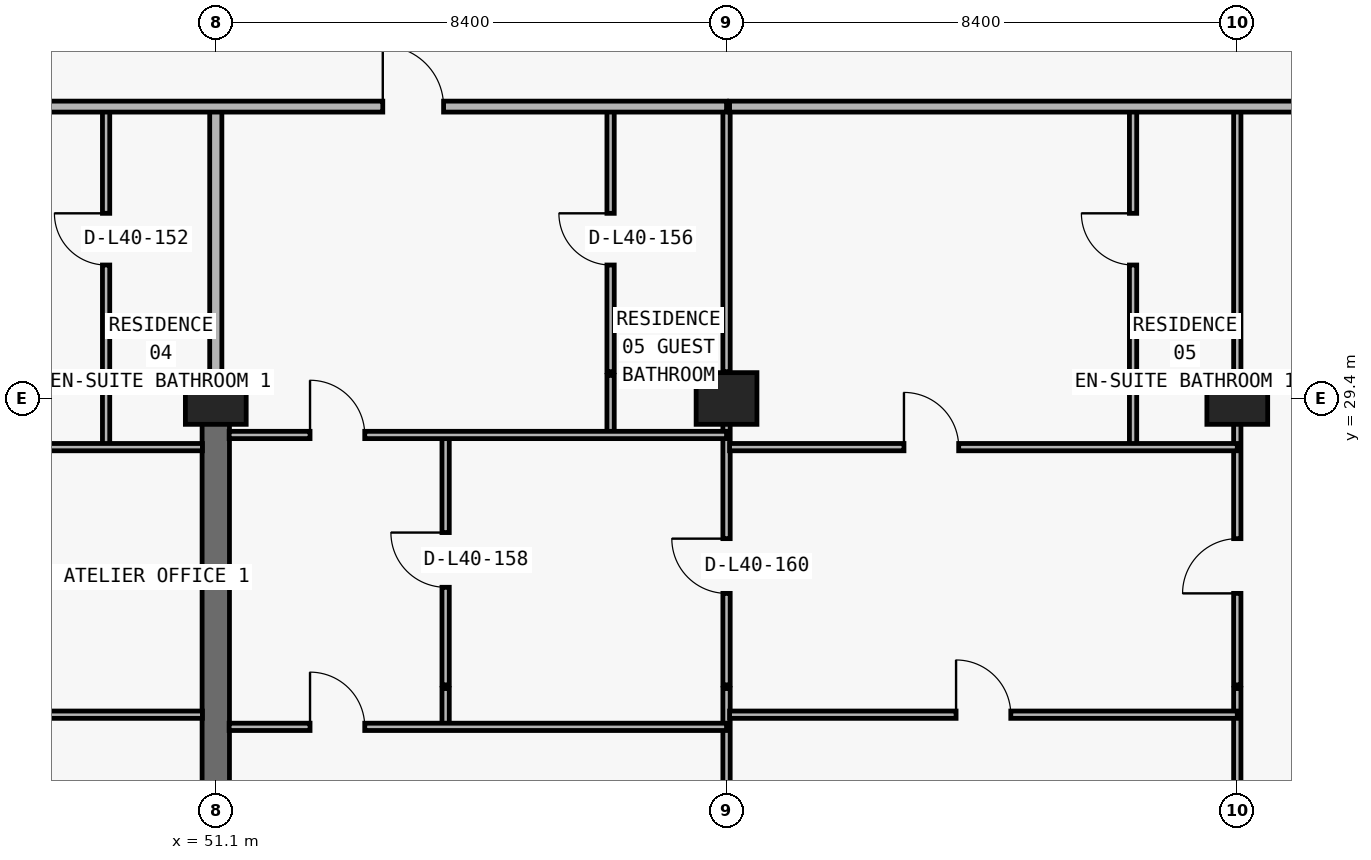
"""IFC4 building model, lengths in metres.
Left out: names, types, materials, properties, quantities, classifications, styles, units other than length and angle.
Written with IfcOpenShell. Run it as: python <this file> out.ifc"""

import sys

from ifc_helpers import new_model, si_unit, direction, frame, frame_2d, origin, origin_2d, place, context, subcontext, project, spatial, rectangle, extrude, element, fill, save


model = new_model("IFC4")
c1 = context("Model", 3, precision=1e-05, world=origin(), true_north=direction((0.0, 1.0)))
c2 = subcontext(c1, "Body", "Model", "MODEL_VIEW")
j1 = project(units=[si_unit("LENGTHUNIT", "METRE"), si_unit("PLANEANGLEUNIT", "RADIAN")], contexts=[c1])
p1 = place(None, origin())
s1 = spatial("IfcSite", under=j1, at=p1, CompositionType="ELEMENT")
p2 = place(p1, origin())
s2 = spatial("IfcBuilding", under=s1, at=p2, CompositionType="ELEMENT")
p3 = place(p2, frame((0.0, 0.0, 145.5)))
s3 = spatial("IfcBuildingStorey", under=s2, at=p3, CompositionType="ELEMENT", Elevation=145.5)
for number, where, z_axis, x_axis in (
    (1, (51.1, 29.4, 0.0), (0.0, 0.0, 1.0), (1.0, 0.0, 0.0)),
    (2, (59.5, 29.4, 0.0), (0.0, 0.0, 1.0), (1.0, 0.0, 0.0)),
    (3, (67.9, 29.4, 0.0), (0.0, 0.0, 1.0), (1.0, 0.0, 0.0)),
):
    element("IfcColumn", number, at=place(p3, frame(where, z_axis=z_axis, x_axis=x_axis)), inside=s3, PredefinedType="COLUMN", context=c2, shape_type="SweptSolid", body=[
        extrude(rectangle(XDim=1.0, YDim=0.85, at=origin_2d()), origin(), (0.0, 0.0, 1.0), 3.05),
    ])
p4 = place(p3, frame((51.1, 20.8, 0.0), z_axis=(0.0, 0.0, 1.0), x_axis=(0.0, 1.0, 0.0)))
e4 = element("IfcWall", 4, at=p4, inside=s3, PredefinedType="SHEAR", context=c2, shape_type="SweptSolid", body=[
    extrude(rectangle(XDim=8.6, YDim=0.45, at=frame_2d((4.3, 0.0))), origin(), (0.0, 0.0, 1.0), 3.05),
])
p5 = place(p3, frame((49.296, 28.6, 0.0), z_axis=(0.0, 0.0, 1.0), x_axis=(0.0, 1.0, 0.0)))
e5 = element("IfcWall", 5, at=p5, inside=s3, PredefinedType="PARTITIONING", context=c2, shape_type="SweptSolid", body=[
    extrude(rectangle(XDim=1.18, YDim=0.12, at=frame_2d((0.59, 0.0))), origin(), (0.0, 0.0, 1.0), 3.05),
])
p6 = place(p3, frame((49.296, 29.84, 0.0), z_axis=(0.0, 0.0, 1.0), x_axis=(0.0, 1.0, 0.0)))
e6 = element("IfcWall", 6, at=p6, inside=s3, PredefinedType="PARTITIONING", context=c2, shape_type="SweptSolid", body=[
    extrude(rectangle(XDim=4.36, YDim=0.12, at=frame_2d((2.18, 0.0))), origin(), (0.0, 0.0, 1.0), 3.05),
])
p7 = place(p6, frame((1.755, 0.0, 0.0)))
e7 = element("IfcOpeningElement", 7, at=p7, cuts=e6, PredefinedType="OPENING", context=c2, shape_type="SweptSolid", body=[
    extrude(rectangle(XDim=0.85, YDim=2.1, at=frame_2d((0.425, 1.05))), frame((0.0, 0.07, 0.0), z_axis=(0.0, -1.0, 0.0), x_axis=(1.0, 0.0, 0.0)), (0.0, 0.0, 1.0), 0.14),
])
p8 = place(p3, frame((51.1, 29.405, 0.0), z_axis=(0.0, 0.0, 1.0), x_axis=(0.0, 1.0, 0.0)))
e8 = element("IfcWall", 8, at=p8, inside=s3, PredefinedType="PARTITIONING", context=c2, shape_type="SweptSolid", body=[
    extrude(rectangle(XDim=0.375, YDim=0.2, at=frame_2d((0.188, 0.0))), origin(), (0.0, 0.0, 1.0), 3.05),
])
p9 = place(p3, frame((51.1, 29.84, 0.0), z_axis=(0.0, 0.0, 1.0), x_axis=(0.0, 1.0, 0.0)))
e9 = element("IfcWall", 9, at=p9, inside=s3, PredefinedType="PARTITIONING", context=c2, shape_type="SweptSolid", body=[
    extrude(rectangle(XDim=4.36, YDim=0.2, at=frame_2d((2.18, 0.0))), origin(), (0.0, 0.0, 1.0), 2.335),
])
p10 = place(p3, frame((54.88, 24.0, 0.0), z_axis=(0.0, 0.0, 1.0), x_axis=(0.0, 1.0, 0.0)))
e10 = element("IfcWall", 10, at=p10, inside=s3, PredefinedType="PARTITIONING", context=c2, shape_type="SweptSolid", body=[
    extrude(rectangle(XDim=0.63, YDim=0.12, at=frame_2d((0.315, 0.0))), origin(), (0.0, 0.0, 1.0), 3.05),
])
p11 = place(p3, frame((54.88, 24.69, 0.0), z_axis=(0.0, 0.0, 1.0), x_axis=(0.0, 1.0, 0.0)))
e11 = element("IfcWall", 11, at=p11, inside=s3, PredefinedType="PARTITIONING", context=c2, shape_type="SweptSolid", body=[
    extrude(rectangle(XDim=4.11, YDim=0.12, at=frame_2d((2.055, 0.0))), origin(), (0.0, 0.0, 1.0), 3.05),
])
p12 = place(p11, frame((1.605, 0.0, 0.0)))
e12 = element("IfcOpeningElement", 12, at=p12, cuts=e11, PredefinedType="OPENING", context=c2, shape_type="SweptSolid", body=[
    extrude(rectangle(XDim=0.9, YDim=2.15, at=frame_2d((0.45, 1.075))), frame((0.0, 0.07, 0.0), z_axis=(0.0, -1.0, 0.0), x_axis=(1.0, 0.0, 0.0)), (0.0, 0.0, 1.0), 0.14),
])
p13 = place(p3, frame((57.593, 28.8, 0.0), z_axis=(0.0, 0.0, 1.0), x_axis=(0.0, 1.0, 0.0)))
e13 = element("IfcWall", 13, at=p13, inside=s3, PredefinedType="PARTITIONING", context=c2, shape_type="SweptSolid", body=[
    extrude(rectangle(XDim=0.98, YDim=0.12, at=frame_2d((0.49, 0.0))), origin(), (0.0, 0.0, 1.0), 3.05),
])
p14 = place(p3, frame((57.593, 29.84, 0.0), z_axis=(0.0, 0.0, 1.0), x_axis=(0.0, 1.0, 0.0)))
e14 = element("IfcWall", 14, at=p14, inside=s3, PredefinedType="PARTITIONING", context=c2, shape_type="SweptSolid", body=[
    extrude(rectangle(XDim=4.36, YDim=0.12, at=frame_2d((2.18, 0.0))), origin(), (0.0, 0.0, 1.0), 3.05),
])
p15 = place(p14, frame((1.755, 0.0, 0.0)))
e15 = element("IfcOpeningElement", 15, at=p15, cuts=e14, PredefinedType="OPENING", context=c2, shape_type="SweptSolid", body=[
    extrude(rectangle(XDim=0.85, YDim=2.1, at=frame_2d((0.425, 1.05))), frame((0.0, 0.07, 0.0), z_axis=(0.0, -1.0, 0.0), x_axis=(1.0, 0.0, 0.0)), (0.0, 0.0, 1.0), 0.14),
])
p16 = place(p3, frame((59.5, 8.84, 0.0), z_axis=(0.0, 0.0, 1.0), x_axis=(0.0, 1.0, 0.0)))
e16 = element("IfcWall", 16, at=p16, inside=s3, PredefinedType="PARTITIONING", context=c2, shape_type="SweptSolid", body=[
    extrude(rectangle(XDim=15.79, YDim=0.12, at=frame_2d((7.895, 0.0))), origin(), (0.0, 0.0, 1.0), 2.174),
])
p17 = place(p3, frame((59.5, 24.69, 0.0), z_axis=(0.0, 0.0, 1.0), x_axis=(0.0, 1.0, 0.0)))
e17 = element("IfcWall", 17, at=p17, inside=s3, PredefinedType="PARTITIONING", context=c2, shape_type="SweptSolid", body=[
    extrude(rectangle(XDim=5.09, YDim=0.12, at=frame_2d((2.545, 0.0))), origin(), (0.0, 0.0, 1.0), 2.174),
])
p18 = place(p17, frame((1.505, 0.0, 0.0)))
e18 = element("IfcOpeningElement", 18, at=p18, cuts=e17, PredefinedType="OPENING", context=c2, shape_type="SweptSolid", body=[
    extrude(rectangle(XDim=0.9, YDim=2.124, at=frame_2d((0.45, 1.062))), frame((0.0, 0.07, 0.0), z_axis=(0.0, -1.0, 0.0), x_axis=(1.0, 0.0, 0.0)), (0.0, 0.0, 1.0), 0.14),
])
p19 = place(p3, frame((59.5, 29.84, 0.0), z_axis=(0.0, 0.0, 1.0), x_axis=(0.0, 1.0, 0.0)))
e19 = element("IfcWall", 19, at=p19, inside=s3, PredefinedType="PARTITIONING", context=c2, shape_type="SweptSolid", body=[
    extrude(rectangle(XDim=4.36, YDim=0.12, at=frame_2d((2.18, 0.0))), origin(), (0.0, 0.0, 1.0), 2.174),
])
p20 = place(p3, frame((66.186, 28.6, 0.0), z_axis=(0.0, 0.0, 1.0), x_axis=(0.0, 1.0, 0.0)))
e20 = element("IfcWall", 20, at=p20, inside=s3, PredefinedType="PARTITIONING", context=c2, shape_type="SweptSolid", body=[
    extrude(rectangle(XDim=1.18, YDim=0.12, at=frame_2d((0.59, 0.0))), origin(), (0.0, 0.0, 1.0), 3.05),
])
p21 = place(p3, frame((66.186, 29.84, 0.0), z_axis=(0.0, 0.0, 1.0), x_axis=(0.0, 1.0, 0.0)))
e21 = element("IfcWall", 21, at=p21, inside=s3, PredefinedType="PARTITIONING", context=c2, shape_type="SweptSolid", body=[
    extrude(rectangle(XDim=4.36, YDim=0.12, at=frame_2d((2.18, 0.0))), origin(), (0.0, 0.0, 1.0), 3.05),
])
p22 = place(p21, frame((1.755, 0.0, 0.0)))
e22 = element("IfcOpeningElement", 22, at=p22, cuts=e21, PredefinedType="OPENING", context=c2, shape_type="SweptSolid", body=[
    extrude(rectangle(XDim=0.85, YDim=2.1, at=frame_2d((0.425, 1.05))), frame((0.0, 0.07, 0.0), z_axis=(0.0, -1.0, 0.0), x_axis=(1.0, 0.0, 0.0)), (0.0, 0.0, 1.0), 0.14),
])
p23 = place(p3, frame((67.9, 8.84, 0.0), z_axis=(0.0, 0.0, 1.0), x_axis=(0.0, 1.0, 0.0)))
e23 = element("IfcWall", 23, at=p23, inside=s3, PredefinedType="PARTITIONING", context=c2, shape_type="SweptSolid", body=[
    extrude(rectangle(XDim=15.79, YDim=0.12, at=frame_2d((7.895, 0.0))), origin(), (0.0, 0.0, 1.0), 2.174),
])
p24 = place(p3, frame((67.9, 24.69, 0.0), z_axis=(0.0, 0.0, 1.0), x_axis=(0.0, 1.0, 0.0)))
e24 = element("IfcWall", 24, at=p24, inside=s3, PredefinedType="PARTITIONING", context=c2, shape_type="SweptSolid", body=[
    extrude(rectangle(XDim=5.09, YDim=0.12, at=frame_2d((2.545, 0.0))), origin(), (0.0, 0.0, 1.0), 2.174),
])
p25 = place(p24, frame((1.505, 0.0, 0.0)))
e25 = element("IfcOpeningElement", 25, at=p25, cuts=e24, PredefinedType="OPENING", context=c2, shape_type="SweptSolid", body=[
    extrude(rectangle(XDim=0.9, YDim=2.124, at=frame_2d((0.45, 1.062))), frame((0.0, 0.07, 0.0), z_axis=(0.0, -1.0, 0.0), x_axis=(1.0, 0.0, 0.0)), (0.0, 0.0, 1.0), 0.14),
])
p26 = place(p3, frame((67.9, 29.84, 0.0), z_axis=(0.0, 0.0, 1.0), x_axis=(0.0, 1.0, 0.0)))
e26 = element("IfcWall", 26, at=p26, inside=s3, PredefinedType="PARTITIONING", context=c2, shape_type="SweptSolid", body=[
    extrude(rectangle(XDim=4.36, YDim=0.12, at=frame_2d((2.18, 0.0))), origin(), (0.0, 0.0, 1.0), 2.174),
])
p27 = place(p3, frame((51.32, 24.0, 0.0), z_axis=(0.0, 0.0, 1.0), x_axis=(1.0, 0.0, 0.0)))
e27 = element("IfcWall", 27, at=p27, inside=s3, PredefinedType="PARTITIONING", context=c2, shape_type="SweptSolid", body=[
    extrude(rectangle(XDim=8.18, YDim=0.12, at=frame_2d((4.09, 0.0))), origin(), (0.0, 0.0, 1.0), 3.05),
])
p28 = place(p27, frame((1.33, 0.0, 0.0)))
e28 = element("IfcOpeningElement", 28, at=p28, cuts=e27, PredefinedType="OPENING", context=c2, shape_type="SweptSolid", body=[
    extrude(rectangle(XDim=0.9, YDim=2.15, at=frame_2d((0.45, 1.075))), frame((0.0, 0.07, 0.0), z_axis=(0.0, -1.0, 0.0), x_axis=(1.0, 0.0, 0.0)), (0.0, 0.0, 1.0), 0.14),
])
p29 = place(p3, frame((42.705, 24.2, 0.0), z_axis=(0.0, 0.0, 1.0), x_axis=(1.0, 0.0, 0.0)))
e29 = element("IfcWall", 29, at=p29, inside=s3, PredefinedType="PARTITIONING", context=c2, shape_type="SweptSolid", body=[
    extrude(rectangle(XDim=8.175, YDim=0.12, at=frame_2d((4.087, 0.0))), origin(), (0.0, 0.0, 1.0), 3.05),
])
p30 = place(p29, frame((3.637, 0.0, 0.0)))
e30 = element("IfcOpeningElement", 30, at=p30, cuts=e29, PredefinedType="OPENING", context=c2, shape_type="SweptSolid", body=[
    extrude(rectangle(XDim=0.9, YDim=2.15, at=frame_2d((0.45, 1.075))), frame((0.0, 0.07, 0.0), z_axis=(0.0, -1.0, 0.0), x_axis=(1.0, 0.0, 0.0)), (0.0, 0.0, 1.0), 0.14),
])
p31 = place(p3, frame((59.55, 24.2, 0.0), z_axis=(0.0, 0.0, 1.0), x_axis=(1.0, 0.0, 0.0)))
e31 = element("IfcWall", 31, at=p31, inside=s3, PredefinedType="PARTITIONING", context=c2, shape_type="SweptSolid", body=[
    extrude(rectangle(XDim=8.35, YDim=0.12, at=frame_2d((4.175, 0.0))), origin(), (0.0, 0.0, 1.0), 3.05),
])
p32 = place(p31, frame((3.725, 0.0, 0.0)))
e32 = element("IfcOpeningElement", 32, at=p32, cuts=e31, PredefinedType="OPENING", context=c2, shape_type="SweptSolid", body=[
    extrude(rectangle(XDim=0.9, YDim=2.15, at=frame_2d((0.45, 1.075))), frame((0.0, 0.07, 0.0), z_axis=(0.0, -1.0, 0.0), x_axis=(1.0, 0.0, 0.0)), (0.0, 0.0, 1.0), 0.14),
])
p33 = place(p3, frame((42.7, 28.6, 0.0), z_axis=(0.0, 0.0, 1.0), x_axis=(1.0, 0.0, 0.0)))
e33 = element("IfcWall", 33, at=p33, inside=s3, PredefinedType="PARTITIONING", context=c2, shape_type="SweptSolid", body=[
    extrude(rectangle(XDim=8.18, YDim=0.12, at=frame_2d((4.09, 0.0))), origin(), (0.0, 0.0, 1.0), 3.05),
])
p34 = place(p33, frame((2.848, 0.0, 0.0)))
e34 = element("IfcOpeningElement", 34, at=p34, cuts=e33, PredefinedType="OPENING", context=c2, shape_type="SweptSolid", body=[
    extrude(rectangle(XDim=0.9, YDim=2.15, at=frame_2d((0.45, 1.075))), frame((0.0, 0.07, 0.0), z_axis=(0.0, -1.0, 0.0), x_axis=(1.0, 0.0, 0.0)), (0.0, 0.0, 1.0), 0.14),
])
p35 = place(p3, frame((59.55, 28.6, 0.0), z_axis=(0.0, 0.0, 1.0), x_axis=(1.0, 0.0, 0.0)))
e35 = element("IfcWall", 35, at=p35, inside=s3, PredefinedType="PARTITIONING", context=c2, shape_type="SweptSolid", body=[
    extrude(rectangle(XDim=8.35, YDim=0.12, at=frame_2d((4.175, 0.0))), origin(), (0.0, 0.0, 1.0), 3.05),
])
p36 = place(p35, frame((2.868, 0.0, 0.0)))
e36 = element("IfcOpeningElement", 36, at=p36, cuts=e35, PredefinedType="OPENING", context=c2, shape_type="SweptSolid", body=[
    extrude(rectangle(XDim=0.9, YDim=2.15, at=frame_2d((0.45, 1.075))), frame((0.0, 0.07, 0.0), z_axis=(0.0, -1.0, 0.0), x_axis=(1.0, 0.0, 0.0)), (0.0, 0.0, 1.0), 0.14),
])
p37 = place(p3, frame((51.32, 28.8, 0.0), z_axis=(0.0, 0.0, 1.0), x_axis=(1.0, 0.0, 0.0)))
e37 = element("IfcWall", 37, at=p37, inside=s3, PredefinedType="PARTITIONING", context=c2, shape_type="SweptSolid", body=[
    extrude(rectangle(XDim=8.18, YDim=0.12, at=frame_2d((4.09, 0.0))), origin(), (0.0, 0.0, 1.0), 3.05),
])
p38 = place(p37, frame((1.33, 0.0, 0.0)))
e38 = element("IfcOpeningElement", 38, at=p38, cuts=e37, PredefinedType="OPENING", context=c2, shape_type="SweptSolid", body=[
    extrude(rectangle(XDim=0.9, YDim=2.15, at=frame_2d((0.45, 1.075))), frame((0.0, 0.07, 0.0), z_axis=(0.0, -1.0, 0.0), x_axis=(1.0, 0.0, 0.0)), (0.0, 0.0, 1.0), 0.14),
])
p39 = place(p3, frame((26.7, 34.2, 0.0), z_axis=(0.0, 0.0, 1.0), x_axis=(1.0, 0.0, 0.0)))
e39 = element("IfcWall", 39, at=p39, inside=s3, PredefinedType="PARTITIONING", context=c2, shape_type="SweptSolid", body=[
    extrude(rectangle(XDim=32.8, YDim=0.18, at=frame_2d((16.4, 0.0))), origin(), (0.0, 0.0, 1.0), 3.05),
])
p40 = place(p39, frame((2.519, 0.0, 0.0)))
e40 = element("IfcOpeningElement", 40, at=p40, cuts=e39, PredefinedType="OPENING", context=c2, shape_type="SweptSolid", body=[
    extrude(rectangle(XDim=1.0, YDim=2.2, at=frame_2d((0.5, 1.1))), frame((0.0, 0.1, 0.0), z_axis=(0.0, -1.0, 0.0), x_axis=(1.0, 0.0, 0.0)), (0.0, 0.0, 1.0), 0.2),
])
p41 = place(p39, frame((10.792, 0.0, 0.0)))
e41 = element("IfcOpeningElement", 41, at=p41, cuts=e39, PredefinedType="OPENING", context=c2, shape_type="SweptSolid", body=[
    extrude(rectangle(XDim=1.0, YDim=2.2, at=frame_2d((0.5, 1.1))), frame((0.0, 0.1, 0.0), z_axis=(0.0, -1.0, 0.0), x_axis=(1.0, 0.0, 0.0)), (0.0, 0.0, 1.0), 0.2),
])
p42 = place(p39, frame((27.146, 0.0, 0.0)))
e42 = element("IfcOpeningElement", 42, at=p42, cuts=e39, PredefinedType="OPENING", context=c2, shape_type="SweptSolid", body=[
    extrude(rectangle(XDim=1.0, YDim=2.2, at=frame_2d((0.5, 1.1))), frame((0.0, 0.1, 0.0), z_axis=(0.0, -1.0, 0.0), x_axis=(1.0, 0.0, 0.0)), (0.0, 0.0, 1.0), 0.2),
])
p43 = place(p3, frame((59.55, 34.2, 0.0), z_axis=(0.0, 0.0, 1.0), x_axis=(1.0, 0.0, 0.0)))
e43 = element("IfcWall", 43, at=p43, inside=s3, PredefinedType="PARTITIONING", context=c2, shape_type="SweptSolid", body=[
    extrude(rectangle(XDim=10.55, YDim=0.18, at=frame_2d((5.275, 0.0))), origin(), (0.0, 0.0, 1.0), 3.05),
])
p44 = place(p7, origin())
e44 = element("IfcDoor", 44, at=p44, inside=s3, OperationType="SINGLE_SWING_RIGHT", PredefinedType="DOOR", context=c2, shape_type="SweptSolid", body=[
    extrude(rectangle(XDim=0.85, YDim=2.1, at=frame_2d((0.425, 1.05))), frame((0.0, 0.025, 0.0), z_axis=(0.0, -1.0, 0.0), x_axis=(1.0, 0.0, 0.0)), (0.0, 0.0, 1.0), 0.05),
])
fill(e7, e44)
p45 = place(p42, origin())
e45 = element("IfcDoor", 45, at=p45, inside=s3, OperationType="SINGLE_SWING_LEFT", PredefinedType="DOOR", context=c2, shape_type="SweptSolid", body=[
    extrude(rectangle(XDim=1.0, YDim=2.2, at=frame_2d((0.5, 1.1))), frame((0.0, 0.025, 0.0), z_axis=(0.0, -1.0, 0.0), x_axis=(1.0, 0.0, 0.0)), (0.0, 0.0, 1.0), 0.05),
])
fill(e42, e45)
p46 = place(p15, origin())
e46 = element("IfcDoor", 46, at=p46, inside=s3, OperationType="SINGLE_SWING_RIGHT", PredefinedType="DOOR", context=c2, shape_type="SweptSolid", body=[
    extrude(rectangle(XDim=0.85, YDim=2.1, at=frame_2d((0.425, 1.05))), frame((0.0, 0.025, 0.0), z_axis=(0.0, -1.0, 0.0), x_axis=(1.0, 0.0, 0.0)), (0.0, 0.0, 1.0), 0.05),
])
fill(e15, e46)
p47 = place(p38, origin())
e47 = element("IfcDoor", 47, at=p47, inside=s3, OperationType="SINGLE_SWING_LEFT", PredefinedType="DOOR", context=c2, shape_type="SweptSolid", body=[
    extrude(rectangle(XDim=0.9, YDim=2.15, at=frame_2d((0.45, 1.075))), frame((0.0, 0.025, 0.0), z_axis=(0.0, -1.0, 0.0), x_axis=(1.0, 0.0, 0.0)), (0.0, 0.0, 1.0), 0.05),
])
fill(e38, e47)
p48 = place(p12, origin())
e48 = element("IfcDoor", 48, at=p48, inside=s3, OperationType="SINGLE_SWING_RIGHT", PredefinedType="DOOR", context=c2, shape_type="SweptSolid", body=[
    extrude(rectangle(XDim=0.9, YDim=2.15, at=frame_2d((0.45, 1.075))), frame((0.0, 0.025, 0.0), z_axis=(0.0, -1.0, 0.0), x_axis=(1.0, 0.0, 0.0)), (0.0, 0.0, 1.0), 0.05),
])
fill(e12, e48)
p49 = place(p28, origin())
e49 = element("IfcDoor", 49, at=p49, inside=s3, OperationType="SINGLE_SWING_LEFT", PredefinedType="DOOR", context=c2, shape_type="SweptSolid", body=[
    extrude(rectangle(XDim=0.9, YDim=2.15, at=frame_2d((0.45, 1.075))), frame((0.0, 0.025, 0.0), z_axis=(0.0, -1.0, 0.0), x_axis=(1.0, 0.0, 0.0)), (0.0, 0.0, 1.0), 0.05),
])
fill(e28, e49)
p50 = place(p18, origin())
e50 = element("IfcDoor", 50, at=p50, inside=s3, OperationType="SINGLE_SWING_RIGHT", PredefinedType="DOOR", context=c2, shape_type="SweptSolid", body=[
    extrude(rectangle(XDim=0.9, YDim=2.124, at=frame_2d((0.45, 1.062))), frame((0.0, 0.025, 0.0), z_axis=(0.0, -1.0, 0.0), x_axis=(1.0, 0.0, 0.0)), (0.0, 0.0, 1.0), 0.05),
])
fill(e18, e50)
p51 = place(p36, origin())
e51 = element("IfcDoor", 51, at=p51, inside=s3, OperationType="SINGLE_SWING_LEFT", PredefinedType="DOOR", context=c2, shape_type="SweptSolid", body=[
    extrude(rectangle(XDim=0.9, YDim=2.15, at=frame_2d((0.45, 1.075))), frame((0.0, 0.025, 0.0), z_axis=(0.0, -1.0, 0.0), x_axis=(1.0, 0.0, 0.0)), (0.0, 0.0, 1.0), 0.05),
])
fill(e36, e51)
p52 = place(p22, origin())
e52 = element("IfcDoor", 52, at=p52, inside=s3, OperationType="SINGLE_SWING_RIGHT", PredefinedType="DOOR", context=c2, shape_type="SweptSolid", body=[
    extrude(rectangle(XDim=0.85, YDim=2.1, at=frame_2d((0.425, 1.05))), frame((0.0, 0.025, 0.0), z_axis=(0.0, -1.0, 0.0), x_axis=(1.0, 0.0, 0.0)), (0.0, 0.0, 1.0), 0.05),
])
fill(e22, e52)
p53 = place(p32, origin())
e53 = element("IfcDoor", 53, at=p53, inside=s3, OperationType="SINGLE_SWING_LEFT", PredefinedType="DOOR", context=c2, shape_type="SweptSolid", body=[
    extrude(rectangle(XDim=0.9, YDim=2.15, at=frame_2d((0.45, 1.075))), frame((0.0, 0.025, 0.0), z_axis=(0.0, -1.0, 0.0), x_axis=(1.0, 0.0, 0.0)), (0.0, 0.0, 1.0), 0.05),
])
fill(e32, e53)
p54 = place(p25, origin())
e54 = element("IfcDoor", 54, at=p54, inside=s3, OperationType="SINGLE_SWING_LEFT", PredefinedType="DOOR", context=c2, shape_type="SweptSolid", body=[
    extrude(rectangle(XDim=0.9, YDim=2.124, at=frame_2d((0.45, 1.062))), frame((0.0, 0.025, 0.0), z_axis=(0.0, -1.0, 0.0), x_axis=(1.0, 0.0, 0.0)), (0.0, 0.0, 1.0), 0.05),
])
fill(e25, e54)
save(model, sys.argv[1])
